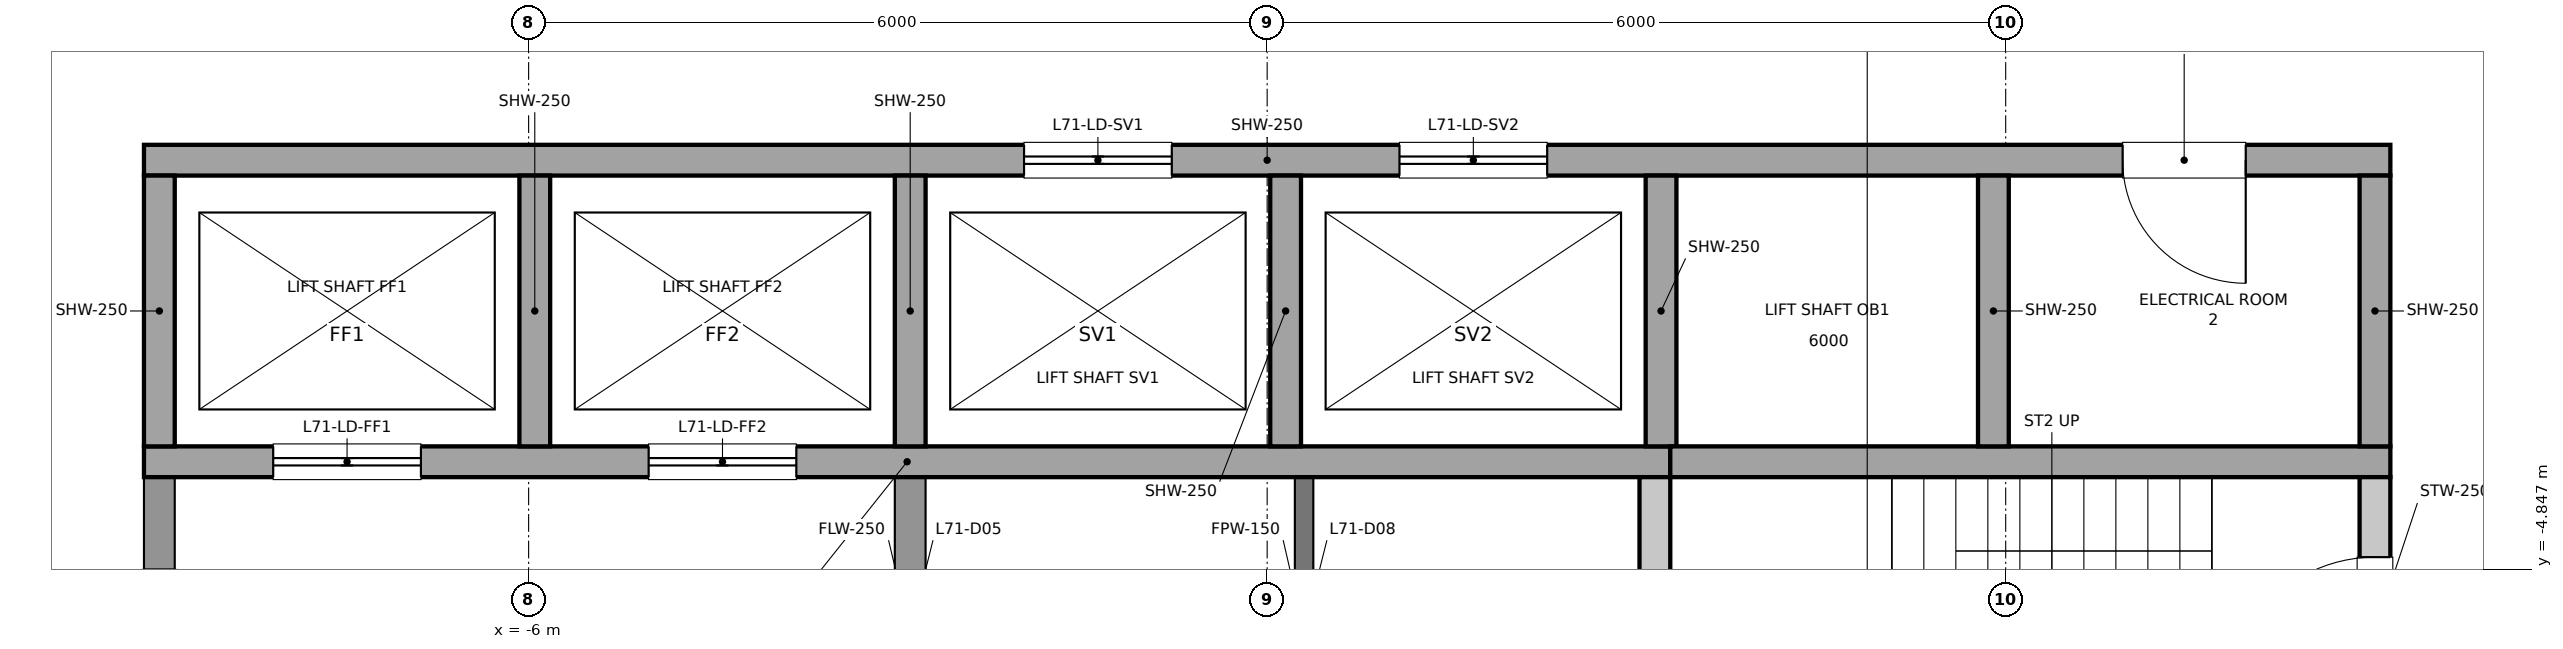
"""IFC4 building model, lengths in metres.
Left out: names, types, materials, properties, quantities, classifications, styles, units other than length and angle.
Written with IfcOpenShell. Run it as: python <this file> out.ifc"""

import sys

from ifc_helpers import new_model, si_unit, direction, frame, frame_2d, origin, place, context, subcontext, project, spatial, rectangle, extrude, element, fill, save


model = new_model("IFC4")
c1 = context("Model", 3, precision=1e-05, world=origin(), true_north=direction((0.0, 1.0)))
c2 = subcontext(c1, "Body", "Model", "MODEL_VIEW")
j1 = project(units=[si_unit("LENGTHUNIT", "METRE"), si_unit("PLANEANGLEUNIT", "RADIAN")], contexts=[c1])
p1 = place(None, origin())
s1 = spatial("IfcSite", under=j1, at=p1, CompositionType="ELEMENT")
p2 = place(p1, origin())
s2 = spatial("IfcBuilding", under=s1, at=p2, CompositionType="ELEMENT")
p3 = place(p2, frame((0.0, 0.0, 320.4)))
s3 = spatial("IfcBuildingStorey", under=s2, at=p3, CompositionType="ELEMENT", Elevation=320.4)
p4 = place(p3, frame((0.3, -6.6, 0.0), z_axis=(0.0, 0.0, 1.0), x_axis=(0.0, 1.0, 0.0)))
e1 = element("IfcWall", 1, at=p4, inside=s3, PredefinedType="PARTITIONING", context=c2, shape_type="SweptSolid", body=[
    extrude(rectangle(XDim=2.5, YDim=0.15, at=frame_2d((1.25, 0.0))), origin(), (0.0, 0.0, 1.0), 3.85),
])
p5 = place(p4, frame((0.8, 0.0, 0.0)))
e2 = element("IfcOpeningElement", 2, at=p5, cuts=e1, PredefinedType="OPENING", context=c2, shape_type="SweptSolid", body=[
    extrude(rectangle(XDim=0.9, YDim=2.1, at=frame_2d((0.45, 1.05))), frame((0.0, 0.075, 0.0), z_axis=(0.0, -1.0, 0.0), x_axis=(1.0, 0.0, 0.0)), (0.0, 0.0, 1.0), 0.15),
])
p6 = place(p3, frame((9.0, -6.6, 0.0), z_axis=(0.0, 0.0, 1.0), x_axis=(0.0, 1.0, 0.0)))
e3 = element("IfcWall", 3, at=p6, inside=s3, PredefinedType="SOLIDWALL", context=c2, shape_type="SweptSolid", body=[
    extrude(rectangle(XDim=2.5, YDim=0.25, at=frame_2d((1.25, 0.0))), origin(), (0.0, 0.0, 1.0), 3.85),
])
p7 = place(p6, frame((0.65, 0.0, 0.0)))
e4 = element("IfcOpeningElement", 4, at=p7, cuts=e3, PredefinedType="OPENING", context=c2, shape_type="SweptSolid", body=[
    extrude(rectangle(XDim=1.2, YDim=2.1, at=frame_2d((0.6, 1.05))), frame((0.0, 0.125, 0.0), z_axis=(0.0, -1.0, 0.0), x_axis=(1.0, 0.0, 0.0)), (0.0, 0.0, 1.0), 0.25),
])
p8 = place(p3, frame((-9.0, -6.6, 0.0), z_axis=(0.0, 0.0, 1.0), x_axis=(0.0, 1.0, 0.0)))
e5 = element("IfcWall", 5, at=p8, inside=s3, PredefinedType="PARTITIONING", context=c2, shape_type="SweptSolid", body=[
    extrude(rectangle(XDim=2.5, YDim=0.25, at=frame_2d((1.25, 0.0))), origin(), (0.0, 0.0, 1.0), 3.85),
])
p9 = place(p8, frame((0.75, 0.0, 0.0)))
e6 = element("IfcOpeningElement", 6, at=p9, cuts=e5, PredefinedType="OPENING", context=c2, shape_type="SweptSolid", body=[
    extrude(rectangle(XDim=1.0, YDim=2.1, at=frame_2d((0.5, 1.05))), frame((0.0, 0.125, 0.0), z_axis=(0.0, -1.0, 0.0), x_axis=(1.0, 0.0, 0.0)), (0.0, 0.0, 1.0), 0.25),
])
p10 = place(p3, frame((3.15, -6.6, 0.0), z_axis=(0.0, 0.0, 1.0), x_axis=(0.0, 1.0, 0.0)))
e7 = element("IfcWall", 7, at=p10, inside=s3, PredefinedType="SOLIDWALL", context=c2, shape_type="SweptSolid", body=[
    extrude(rectangle(XDim=2.5, YDim=0.25, at=frame_2d((1.25, 0.0))), origin(), (0.0, 0.0, 1.0), 3.85),
])
p11 = place(p3, frame((-2.9, -6.6, 0.0), z_axis=(0.0, 0.0, 1.0), x_axis=(0.0, 1.0, 0.0)))
e8 = element("IfcWall", 8, at=p11, inside=s3, PredefinedType="PARTITIONING", context=c2, shape_type="SweptSolid", body=[
    extrude(rectangle(XDim=2.5, YDim=0.25, at=frame_2d((1.25, 0.0))), origin(), (0.0, 0.0, 1.0), 3.85),
])
p12 = place(p11, frame((0.8, 0.0, 0.0)))
e9 = element("IfcOpeningElement", 9, at=p12, cuts=e8, PredefinedType="OPENING", context=c2, shape_type="SweptSolid", body=[
    extrude(rectangle(XDim=0.9, YDim=2.1, at=frame_2d((0.45, 1.05))), frame((0.0, 0.125, 0.0), z_axis=(0.0, -1.0, 0.0), x_axis=(1.0, 0.0, 0.0)), (0.0, 0.0, 1.0), 0.25),
])
p13 = place(p3, frame((-9.125, -1.525, 0.0), z_axis=(0.0, 0.0, 1.0), x_axis=(1.0, 0.0, 0.0)))
e10 = element("IfcWall", 10, at=p13, inside=s3, PredefinedType="SOLIDWALL", context=c2, shape_type="SweptSolid", body=[
    extrude(rectangle(XDim=18.25, YDim=0.25, at=frame_2d((9.125, 0.0))), origin(), (0.0, 0.0, 1.0), 3.85),
])
p14 = place(p13, frame((7.15, 0.0, 0.0)))
e11 = element("IfcOpeningElement", 11, at=p14, cuts=e10, PredefinedType="OPENING", context=c2, shape_type="SweptSolid", body=[
    extrude(rectangle(XDim=1.2, YDim=2.1, at=frame_2d((0.6, 1.05))), frame((0.0, 0.125, 0.0), z_axis=(0.0, -1.0, 0.0), x_axis=(1.0, 0.0, 0.0)), (0.0, 0.0, 1.0), 0.25),
])
p15 = place(p13, frame((10.2, 0.0, 0.0)))
e12 = element("IfcOpeningElement", 12, at=p15, cuts=e10, PredefinedType="OPENING", context=c2, shape_type="SweptSolid", body=[
    extrude(rectangle(XDim=1.2, YDim=2.1, at=frame_2d((0.6, 1.05))), frame((0.0, 0.125, 0.0), z_axis=(0.0, -1.0, 0.0), x_axis=(1.0, 0.0, 0.0)), (0.0, 0.0, 1.0), 0.25),
])
p16 = place(p13, frame((16.075, 0.0, 0.0)))
e13 = element("IfcOpeningElement", 13, at=p16, cuts=e10, PredefinedType="OPENING", context=c2, shape_type="SweptSolid", body=[
    extrude(rectangle(XDim=1.0, YDim=2.1, at=frame_2d((0.5, 1.05))), frame((0.0, 0.125, 0.0), z_axis=(0.0, -1.0, 0.0), x_axis=(1.0, 0.0, 0.0)), (0.0, 0.0, 1.0), 0.25),
])
p17 = place(p3, frame((-9.125, -3.975, 0.0), z_axis=(0.0, 0.0, 1.0), x_axis=(1.0, 0.0, 0.0)))
e14 = element("IfcWall", 14, at=p17, inside=s3, PredefinedType="SOLIDWALL", context=c2, shape_type="SweptSolid", body=[
    extrude(rectangle(XDim=12.4, YDim=0.25, at=frame_2d((6.2, 0.0))), origin(), (0.0, 0.0, 1.0), 3.85),
])
p18 = place(p17, frame((1.05, 0.0, 0.0)))
e15 = element("IfcOpeningElement", 15, at=p18, cuts=e14, PredefinedType="OPENING", context=c2, shape_type="SweptSolid", body=[
    extrude(rectangle(XDim=1.2, YDim=2.1, at=frame_2d((0.6, 1.05))), frame((0.0, 0.125, 0.0), z_axis=(0.0, -1.0, 0.0), x_axis=(1.0, 0.0, 0.0)), (0.0, 0.0, 1.0), 0.25),
])
p19 = place(p17, frame((4.1, 0.0, 0.0)))
e16 = element("IfcOpeningElement", 16, at=p19, cuts=e14, PredefinedType="OPENING", context=c2, shape_type="SweptSolid", body=[
    extrude(rectangle(XDim=1.2, YDim=2.1, at=frame_2d((0.6, 1.05))), frame((0.0, 0.125, 0.0), z_axis=(0.0, -1.0, 0.0), x_axis=(1.0, 0.0, 0.0)), (0.0, 0.0, 1.0), 0.25),
])
p20 = place(p3, frame((3.275, -3.975, 0.0), z_axis=(0.0, 0.0, 1.0), x_axis=(1.0, 0.0, 0.0)))
e17 = element("IfcWall", 17, at=p20, inside=s3, PredefinedType="SOLIDWALL", context=c2, shape_type="SweptSolid", body=[
    extrude(rectangle(XDim=5.85, YDim=0.25, at=frame_2d((2.925, 0.0))), origin(), (0.0, 0.0, 1.0), 3.85),
])
for number, where, z_axis, x_axis in (
    (18, (-9.0, -3.85, 0.0), (0.0, 0.0, 1.0), (0.0, 1.0, 0.0)),
    (19, (-5.95, -3.85, 0.0), (0.0, 0.0, 1.0), (0.0, 1.0, 0.0)),
    (20, (-2.9, -3.85, 0.0), (0.0, 0.0, 1.0), (0.0, 1.0, 0.0)),
    (21, (0.15, -3.85, 0.0), (0.0, 0.0, 1.0), (0.0, 1.0, 0.0)),
    (22, (3.2, -3.85, 0.0), (0.0, 0.0, 1.0), (0.0, 1.0, 0.0)),
    (23, (5.9, -3.85, 0.0), (0.0, 0.0, 1.0), (0.0, 1.0, 0.0)),
    (24, (9.0, -3.85, 0.0), (0.0, 0.0, 1.0), (0.0, 1.0, 0.0)),
):
    element("IfcWall", number, at=place(p3, frame(where, z_axis=z_axis, x_axis=x_axis)), inside=s3, PredefinedType="SOLIDWALL", context=c2, shape_type="SweptSolid", body=[
        extrude(rectangle(XDim=2.2, YDim=0.25, at=frame_2d((1.1, 0.0))), origin(), (0.0, 0.0, 1.0), 3.85),
    ])
p21 = place(p18, origin())
e25 = element("IfcDoor", 25, at=p21, inside=s3, OperationType="DOUBLE_DOOR_SLIDING", PredefinedType="DOOR", context=c2, shape_type="SweptSolid", body=[
    extrude(rectangle(XDim=1.2, YDim=2.1, at=frame_2d((0.6, 1.05))), frame((0.0, 0.025, 0.0), z_axis=(0.0, -1.0, 0.0), x_axis=(1.0, 0.0, 0.0)), (0.0, 0.0, 1.0), 0.05),
])
fill(e15, e25)
p22 = place(p19, origin())
e26 = element("IfcDoor", 26, at=p22, inside=s3, OperationType="DOUBLE_DOOR_SLIDING", PredefinedType="DOOR", context=c2, shape_type="SweptSolid", body=[
    extrude(rectangle(XDim=1.2, YDim=2.1, at=frame_2d((0.6, 1.05))), frame((0.0, 0.025, 0.0), z_axis=(0.0, -1.0, 0.0), x_axis=(1.0, 0.0, 0.0)), (0.0, 0.0, 1.0), 0.05),
])
fill(e16, e26)
p23 = place(p14, origin())
e27 = element("IfcDoor", 27, at=p23, inside=s3, OperationType="DOUBLE_DOOR_SLIDING", PredefinedType="DOOR", context=c2, shape_type="SweptSolid", body=[
    extrude(rectangle(XDim=1.2, YDim=2.1, at=frame_2d((0.6, 1.05))), frame((0.0, 0.025, 0.0), z_axis=(0.0, -1.0, 0.0), x_axis=(1.0, 0.0, 0.0)), (0.0, 0.0, 1.0), 0.05),
])
fill(e11, e27)
p24 = place(p15, origin())
e28 = element("IfcDoor", 28, at=p24, inside=s3, OperationType="DOUBLE_DOOR_SLIDING", PredefinedType="DOOR", context=c2, shape_type="SweptSolid", body=[
    extrude(rectangle(XDim=1.2, YDim=2.1, at=frame_2d((0.6, 1.05))), frame((0.0, 0.025, 0.0), z_axis=(0.0, -1.0, 0.0), x_axis=(1.0, 0.0, 0.0)), (0.0, 0.0, 1.0), 0.05),
])
fill(e12, e28)
p25 = place(p7, origin())
e29 = element("IfcDoor", 29, at=p25, inside=s3, OperationType="SINGLE_SWING_LEFT", PredefinedType="DOOR", context=c2, shape_type="SweptSolid", body=[
    extrude(rectangle(XDim=1.2, YDim=2.1, at=frame_2d((0.6, 1.05))), frame((0.0, 0.025, 0.0), z_axis=(0.0, -1.0, 0.0), x_axis=(1.0, 0.0, 0.0)), (0.0, 0.0, 1.0), 0.05),
])
fill(e4, e29)
p26 = place(p16, origin())
e30 = element("IfcDoor", 30, at=p26, inside=s3, OperationType="SINGLE_SWING_RIGHT", PredefinedType="DOOR", context=c2, shape_type="SweptSolid", body=[
    extrude(rectangle(XDim=1.0, YDim=2.1, at=frame_2d((0.5, 1.05))), frame((0.0, 0.025, 0.0), z_axis=(0.0, -1.0, 0.0), x_axis=(1.0, 0.0, 0.0)), (0.0, 0.0, 1.0), 0.05),
])
fill(e13, e30)
save(model, sys.argv[1])
